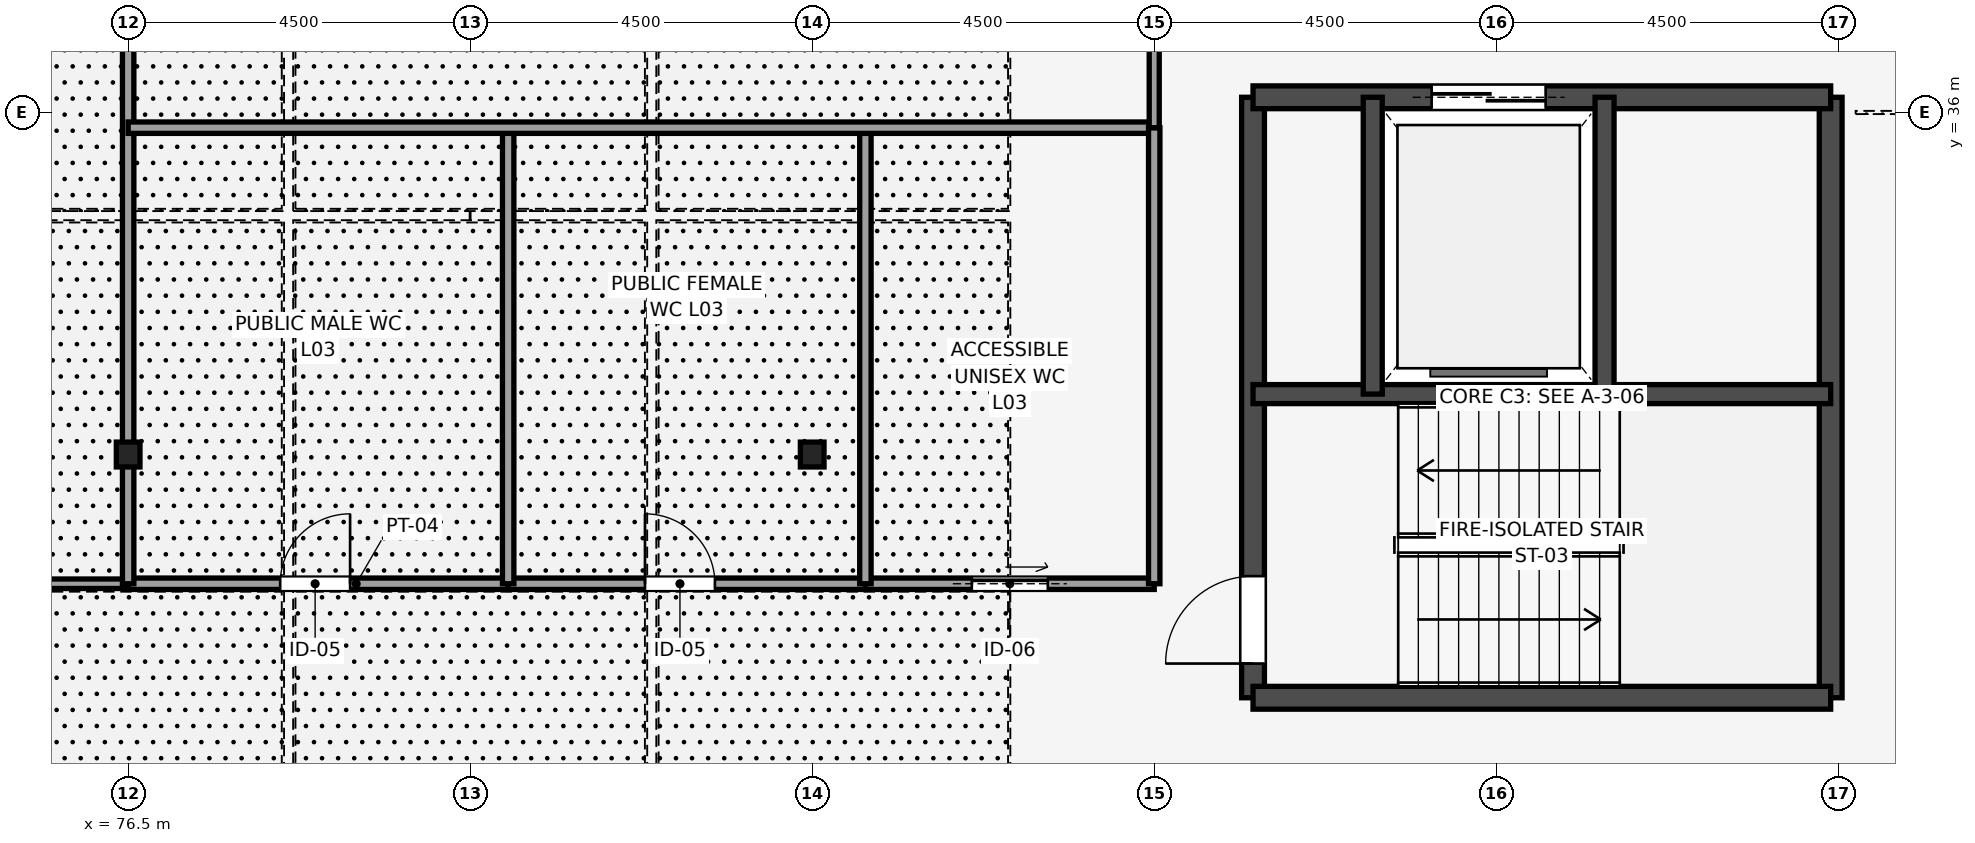
"""IFC4 building model, lengths in metres.
Left out: names, types, materials, properties, quantities, classifications, styles, units other than length and angle.
Written with IfcOpenShell. Run it as: python <this file> out.ifc"""

import sys

from ifc_helpers import new_model, si_unit, direction, frame, frame_2d, origin, origin_2d, place, context, subcontext, project, spatial, rectangle, i_section, extrude, element, fill, save


model = new_model("IFC4")
c1 = context("Model", 3, precision=1e-05, world=origin(), true_north=direction((0.0, 1.0)))
c2 = subcontext(c1, "Body", "Model", "MODEL_VIEW")
j1 = project(units=[si_unit("LENGTHUNIT", "METRE"), si_unit("PLANEANGLEUNIT", "RADIAN")], contexts=[c1])
p1 = place(None, origin())
s1 = spatial("IfcSite", under=j1, at=p1, CompositionType="ELEMENT")
p2 = place(p1, origin())
s2 = spatial("IfcBuilding", under=s1, at=p2, CompositionType="ELEMENT")
p3 = place(p2, frame((0.0, 0.0, 14.4)))
s3 = spatial("IfcBuildingStorey", under=s2, at=p3, CompositionType="ELEMENT", Elevation=14.4)
for number, where, z_axis, x_axis in (
    (1, (76.5, 31.5, 0.0), (0.0, 0.0, 1.0), (1.0, 0.0, 0.0)),
    (2, (85.5, 31.5, 0.0), (0.0, 0.0, 1.0), (1.0, 0.0, 0.0)),
):
    element("IfcColumn", number, at=place(p3, frame(where, z_axis=z_axis, x_axis=x_axis)), inside=s3, PredefinedType="COLUMN", context=c2, shape_type="SweptSolid", body=[
        extrude(i_section(OverallWidth=0.311, OverallDepth=0.327, WebThickness=0.016, FlangeThickness=0.025, FilletRadius=0.017, at=origin_2d()), origin(), (0.0, 0.0, 1.0), 4.5),
    ])
p4 = place(p3, frame((91.3, 28.3, 0.0), z_axis=(0.0, 0.0, 1.0), x_axis=(0.0, 1.0, 0.0)))
e3 = element("IfcWall", 3, at=p4, inside=s3, PredefinedType="SHEAR", context=c2, shape_type="SweptSolid", body=[
    extrude(rectangle(XDim=7.9, YDim=0.3, at=frame_2d((3.95, 0.0))), origin(), (0.0, 0.0, 1.0), 4.5),
])
p5 = place(p4, frame((0.45, 0.0, 0.0)))
e4 = element("IfcOpeningElement", 4, at=p5, cuts=e3, PredefinedType="OPENING", context=c2, shape_type="SweptSolid", body=[
    extrude(rectangle(XDim=1.15, YDim=2.15, at=frame_2d((0.575, 1.075))), frame((0.0, 0.16, 0.0), z_axis=(0.0, -1.0, 0.0), x_axis=(1.0, 0.0, 0.0)), (0.0, 0.0, 1.0), 0.32),
])
p6 = place(p3, frame((98.9, 28.3, 0.0), z_axis=(0.0, 0.0, 1.0), x_axis=(0.0, 1.0, 0.0)))
e5 = element("IfcWall", 5, at=p6, inside=s3, PredefinedType="SHEAR", context=c2, shape_type="SweptSolid", body=[
    extrude(rectangle(XDim=7.9, YDim=0.3, at=frame_2d((3.95, 0.0))), origin(), (0.0, 0.0, 1.0), 4.5),
])
p7 = place(p3, frame((91.3, 28.3, 0.0), z_axis=(0.0, 0.0, 1.0), x_axis=(1.0, 0.0, 0.0)))
e6 = element("IfcWall", 6, at=p7, inside=s3, PredefinedType="SHEAR", context=c2, shape_type="SweptSolid", body=[
    extrude(rectangle(XDim=7.6, YDim=0.3, at=frame_2d((3.8, 0.0))), origin(), (0.0, 0.0, 1.0), 4.5),
])
p8 = place(p3, frame((91.3, 36.2, 0.0), z_axis=(0.0, 0.0, 1.0), x_axis=(1.0, 0.0, 0.0)))
e7 = element("IfcWall", 7, at=p8, inside=s3, PredefinedType="SHEAR", context=c2, shape_type="SweptSolid", body=[
    extrude(rectangle(XDim=7.6, YDim=0.3, at=frame_2d((3.8, 0.0))), origin(), (0.0, 0.0, 1.0), 4.5),
])
p9 = place(p8, frame((2.35, 0.0, 0.0)))
e8 = element("IfcOpeningElement", 8, at=p9, cuts=e7, PredefinedType="OPENING", context=c2, shape_type="SweptSolid", body=[
    extrude(rectangle(XDim=1.5, YDim=2.4, at=frame_2d((0.75, 1.2))), frame((0.0, 0.16, 0.0), z_axis=(0.0, -1.0, 0.0), x_axis=(1.0, 0.0, 0.0)), (0.0, 0.0, 1.0), 0.32),
])
p10 = place(p3, frame((91.3, 32.295, 0.0), z_axis=(0.0, 0.0, 1.0), x_axis=(1.0, 0.0, 0.0)))
e9 = element("IfcWall", 9, at=p10, inside=s3, PredefinedType="SHEAR", context=c2, shape_type="SweptSolid", body=[
    extrude(rectangle(XDim=7.6, YDim=0.25, at=frame_2d((3.8, 0.0))), origin(), (0.0, 0.0, 1.0), 4.5),
])
for number, where, z_axis, x_axis in (
    (10, (92.875, 32.295, 0.0), (0.0, 0.0, 1.0), (0.0, 1.0, 0.0)),
    (11, (95.925, 32.295, 0.0), (0.0, 0.0, 1.0), (0.0, 1.0, 0.0)),
):
    element("IfcWall", number, at=place(p3, frame(where, z_axis=z_axis, x_axis=x_axis)), inside=s3, PredefinedType="SHEAR", context=c2, shape_type="SweptSolid", body=[
        extrude(rectangle(XDim=3.905, YDim=0.25, at=frame_2d((1.953, 0.0))), origin(), (0.0, 0.0, 1.0), 4.5),
    ])
p11 = place(p3, frame((58.5, 29.8, 0.0), z_axis=(0.0, 0.0, 1.0), x_axis=(1.0, 0.0, 0.0)))
e12 = element("IfcWall", 12, at=p11, inside=s3, PredefinedType="MOVABLE", context=c2, shape_type="SweptSolid", body=[
    extrude(rectangle(XDim=18.0, YDim=0.125, at=frame_2d((9.0, 0.0))), origin(), (0.0, 0.0, 1.0), 4.32),
])
p12 = place(p11, frame((5.2, 0.0, 0.0)))
e13 = element("IfcOpeningElement", 13, at=p12, cuts=e12, PredefinedType="OPENING", context=c2, shape_type="SweptSolid", body=[
    extrude(rectangle(XDim=2.0, YDim=2.4, at=frame_2d((1.0, 1.2))), frame((0.0, 0.073, 0.0), z_axis=(0.0, -1.0, 0.0), x_axis=(1.0, 0.0, 0.0)), (0.0, 0.0, 1.0), 0.145),
])
p13 = place(p3, frame((76.5, 29.8, 0.0), z_axis=(0.0, 0.0, 1.0), x_axis=(1.0, 0.0, 0.0)))
e14 = element("IfcWall", 14, at=p13, inside=s3, PredefinedType="PARTITIONING", context=c2, shape_type="SweptSolid", body=[
    extrude(rectangle(XDim=5.0, YDim=0.15, at=frame_2d((2.5, 0.0))), origin(), (0.0, 0.0, 1.0), 4.32),
])
p14 = place(p13, frame((2.0, 0.0, 0.0)))
e15 = element("IfcOpeningElement", 15, at=p14, cuts=e14, PredefinedType="OPENING", context=c2, shape_type="SweptSolid", body=[
    extrude(rectangle(XDim=0.92, YDim=2.15, at=frame_2d((0.46, 1.075))), frame((0.0, 0.085, 0.0), z_axis=(0.0, -1.0, 0.0), x_axis=(1.0, 0.0, 0.0)), (0.0, 0.0, 1.0), 0.17),
])
p15 = place(p3, frame((81.5, 29.8, 0.0), z_axis=(0.0, 0.0, 1.0), x_axis=(1.0, 0.0, 0.0)))
e16 = element("IfcWall", 16, at=p15, inside=s3, PredefinedType="PARTITIONING", context=c2, shape_type="SweptSolid", body=[
    extrude(rectangle(XDim=4.7, YDim=0.15, at=frame_2d((2.35, 0.0))), origin(), (0.0, 0.0, 1.0), 4.32),
])
p16 = place(p15, frame((1.8, 0.0, 0.0)))
e17 = element("IfcOpeningElement", 17, at=p16, cuts=e16, PredefinedType="OPENING", context=c2, shape_type="SweptSolid", body=[
    extrude(rectangle(XDim=0.92, YDim=2.15, at=frame_2d((0.46, 1.075))), frame((0.0, 0.085, 0.0), z_axis=(0.0, -1.0, 0.0), x_axis=(1.0, 0.0, 0.0)), (0.0, 0.0, 1.0), 0.17),
])
p17 = place(p3, frame((86.2, 29.8, 0.0), z_axis=(0.0, 0.0, 1.0), x_axis=(1.0, 0.0, 0.0)))
e18 = element("IfcWall", 18, at=p17, inside=s3, PredefinedType="PARTITIONING", context=c2, shape_type="SweptSolid", body=[
    extrude(rectangle(XDim=3.8, YDim=0.15, at=frame_2d((1.9, 0.0))), origin(), (0.0, 0.0, 1.0), 4.32),
])
p18 = place(p17, frame((1.4, 0.0, 0.0)))
e19 = element("IfcOpeningElement", 19, at=p18, cuts=e18, PredefinedType="OPENING", context=c2, shape_type="SweptSolid", body=[
    extrude(rectangle(XDim=1.0, YDim=2.15, at=frame_2d((0.5, 1.075))), frame((0.0, 0.085, 0.0), z_axis=(0.0, -1.0, 0.0), x_axis=(1.0, 0.0, 0.0)), (0.0, 0.0, 1.0), 0.17),
])
p19 = place(p3, frame((76.5, 29.8, 0.0), z_axis=(0.0, 0.0, 1.0), x_axis=(0.0, 1.0, 0.0)))
e20 = element("IfcWall", 20, at=p19, inside=s3, PredefinedType="PARTITIONING", context=c2, shape_type="SweptSolid", body=[
    extrude(rectangle(XDim=10.7, YDim=0.15, at=frame_2d((5.35, 0.0))), origin(), (0.0, 0.0, 1.0), 3.772),
])
for number, where, z_axis, x_axis in (
    (21, (81.5, 29.8, 0.0), (0.0, 0.0, 1.0), (0.0, 1.0, 0.0)),
    (22, (86.2, 29.8, 0.0), (0.0, 0.0, 1.0), (0.0, 1.0, 0.0)),
):
    element("IfcWall", number, at=place(p3, frame(where, z_axis=z_axis, x_axis=x_axis)), inside=s3, PredefinedType="PARTITIONING", context=c2, shape_type="SweptSolid", body=[
        extrude(rectangle(XDim=6.0, YDim=0.15, at=frame_2d((3.0, 0.0))), origin(), (0.0, 0.0, 1.0), 4.32),
    ])
p20 = place(p3, frame((76.5, 35.8, 0.0), z_axis=(0.0, 0.0, 1.0), x_axis=(1.0, 0.0, 0.0)))
e23 = element("IfcWall", 23, at=p20, inside=s3, PredefinedType="PARTITIONING", context=c2, shape_type="SweptSolid", body=[
    extrude(rectangle(XDim=13.5, YDim=0.15, at=frame_2d((6.75, 0.0))), origin(), (0.0, 0.0, 1.0), 4.32),
])
p21 = place(p3, frame((90.0, 29.8, 0.0), z_axis=(0.0, 0.0, 1.0), x_axis=(0.0, 1.0, 0.0)))
e24 = element("IfcWall", 24, at=p21, inside=s3, PredefinedType="PARTITIONING", context=c2, shape_type="SweptSolid", body=[
    extrude(rectangle(XDim=6.0, YDim=0.15, at=frame_2d((3.0, 0.0))), origin(), (0.0, 0.0, 1.0), 4.32),
])
p22 = place(p3, frame((90.0, 35.8, 0.0), z_axis=(0.0, 0.0, 1.0), x_axis=(0.0, 1.0, 0.0)))
e25 = element("IfcWall", 25, at=p22, inside=s3, PredefinedType="PARTITIONING", context=c2, shape_type="SweptSolid", body=[
    extrude(rectangle(XDim=4.7, YDim=0.132, at=frame_2d((2.35, 0.0))), origin(), (0.0, 0.0, 1.0), 4.32),
])
p23 = place(p22, frame((1.6, 0.0, 0.0)))
e26 = element("IfcOpeningElement", 26, at=p23, cuts=e25, PredefinedType="OPENING", context=c2, shape_type="SweptSolid", body=[
    extrude(rectangle(XDim=1.4, YDim=2.2, at=frame_2d((0.7, 1.1))), frame((0.0, 0.076, 0.0), z_axis=(0.0, -1.0, 0.0), x_axis=(1.0, 0.0, 0.0)), (0.0, 0.0, 1.0), 0.152),
])
p24 = place(p5, origin())
e27 = element("IfcDoor", 27, at=p24, inside=s3, OperationType="SINGLE_SWING_LEFT", PredefinedType="DOOR", context=c2, shape_type="SweptSolid", body=[
    extrude(rectangle(XDim=1.15, YDim=2.15, at=frame_2d((0.575, 1.075))), frame((0.0, 0.025, 0.0), z_axis=(0.0, -1.0, 0.0), x_axis=(1.0, 0.0, 0.0)), (0.0, 0.0, 1.0), 0.05),
])
fill(e4, e27)
p25 = place(p9, origin())
e28 = element("IfcDoor", 28, at=p25, inside=s3, OperationType="DOUBLE_DOOR_SLIDING", PredefinedType="DOOR", context=c2, shape_type="SweptSolid", body=[
    extrude(rectangle(XDim=1.5, YDim=2.4, at=frame_2d((0.75, 1.2))), frame((0.0, 0.025, 0.0), z_axis=(0.0, -1.0, 0.0), x_axis=(1.0, 0.0, 0.0)), (0.0, 0.0, 1.0), 0.05),
])
fill(e8, e28)
p26 = place(p14, origin())
e29 = element("IfcDoor", 29, at=p26, inside=s3, OperationType="SINGLE_SWING_RIGHT", PredefinedType="DOOR", context=c2, shape_type="SweptSolid", body=[
    extrude(rectangle(XDim=0.92, YDim=2.15, at=frame_2d((0.46, 1.075))), frame((0.0, 0.025, 0.0), z_axis=(0.0, -1.0, 0.0), x_axis=(1.0, 0.0, 0.0)), (0.0, 0.0, 1.0), 0.05),
])
fill(e15, e29)
p27 = place(p16, origin())
e30 = element("IfcDoor", 30, at=p27, inside=s3, OperationType="SINGLE_SWING_LEFT", PredefinedType="DOOR", context=c2, shape_type="SweptSolid", body=[
    extrude(rectangle(XDim=0.92, YDim=2.15, at=frame_2d((0.46, 1.075))), frame((0.0, 0.025, 0.0), z_axis=(0.0, -1.0, 0.0), x_axis=(1.0, 0.0, 0.0)), (0.0, 0.0, 1.0), 0.05),
])
fill(e17, e30)
p28 = place(p18, origin())
e31 = element("IfcDoor", 31, at=p28, inside=s3, OperationType="SLIDING_TO_LEFT", PredefinedType="DOOR", context=c2, shape_type="SweptSolid", body=[
    extrude(rectangle(XDim=1.0, YDim=2.15, at=frame_2d((0.5, 1.075))), frame((0.0, 0.025, 0.0), z_axis=(0.0, -1.0, 0.0), x_axis=(1.0, 0.0, 0.0)), (0.0, 0.0, 1.0), 0.05),
])
fill(e19, e31)
save(model, sys.argv[1])
